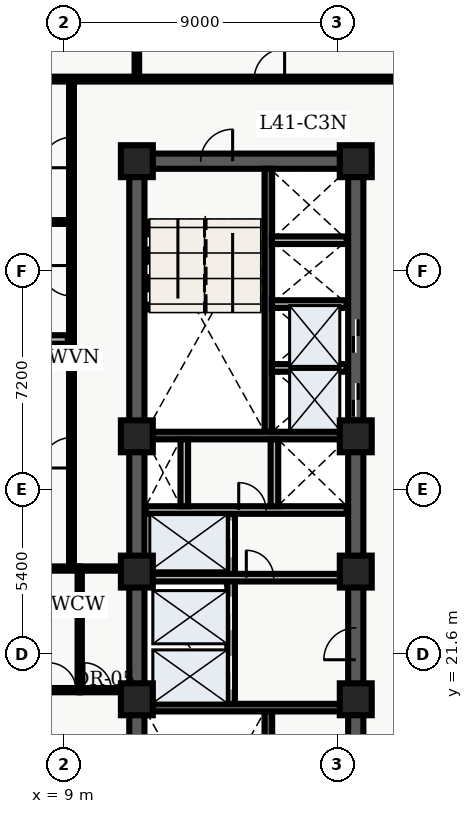
"""IFC4 building model, lengths in metres.
Left out: names, types, materials, properties, quantities, classifications, styles, units other than length and angle.
Written with IfcOpenShell. Run it as: python <this file> out.ifc"""

import sys

from ifc_helpers import new_model, entity, si_unit, converted_unit, direction, frame, origin_with_axes, origin_2d_with_axis, place, context, subcontext, project, spatial, polyline, rectangle, outline, extrude, element, fill, save


model = new_model("IFC4")
c1 = context("Model", 3, precision=1e-05, world=origin_with_axes(), true_north=direction((0.0, 1.0)))
c2 = subcontext(c1, "Body", "Model", "MODEL_VIEW")
j1 = project(units=[si_unit("LENGTHUNIT", "METRE"), converted_unit("PLANEANGLEUNIT", "DEGREE", entity("IfcPlaneAngleMeasure", 0.017), si_unit("PLANEANGLEUNIT", "RADIAN"), dimensions=[0, 0, 0, 0, 0, 0, 0])], contexts=[c1])
p1 = place(None, origin_with_axes())
s1 = spatial("IfcSite", under=j1, at=p1, CompositionType="ELEMENT")
p2 = place(p1, origin_with_axes())
s2 = spatial("IfcBuilding", under=s1, at=p2, CompositionType="ELEMENT")
p3 = place(p2, frame((0.0, 0.0, 168.0), z_axis=(0.0, 0.0, 1.0), x_axis=(1.0, 0.0, 0.0)))
s3 = spatial("IfcBuildingStorey", under=s2, at=p3, CompositionType="ELEMENT", Elevation=168.0)
p4 = place(p3, frame((11.4, 10.8, 0.0), z_axis=(0.0, 0.0, 1.0), x_axis=(0.0, 1.0, 0.0)))
e1 = element("IfcWall", 1, at=p4, inside=s3, PredefinedType="SHEAR", context=c2, shape_type="SweptSolid", body=[
    extrude(outline(polyline([(0.0, -0.25), (27.0, -0.25), (27.0, 0.25), (0.0, 0.25), (0.0, -0.25)])), origin_with_axes(), (0.0, 0.0, 1.0), 3.66),
])
p5 = place(p3, frame((11.4, 37.8, 0.0), z_axis=(0.0, 0.0, 1.0), x_axis=(1.0, 0.0, 0.0)))
e2 = element("IfcWall", 2, at=p5, inside=s3, PredefinedType="SHEAR", context=c2, shape_type="SweptSolid", body=[
    extrude(outline(polyline([(0.0, -0.25), (7.2, -0.25), (7.2, 0.25), (0.0, 0.25), (0.0, -0.25)])), origin_with_axes(), (0.0, 0.0, 1.0), 3.66),
])
p6 = place(p5, frame((2.625, 0.0, 0.0), z_axis=(0.0, 0.0, 1.0), x_axis=(1.0, 0.0, 0.0)))
e3 = element("IfcOpeningElement", 3, at=p6, cuts=e2, PredefinedType="OPENING", context=c2, shape_type="SweptSolid", body=[
    extrude(rectangle(XDim=1.05, YDim=0.52, at=origin_2d_with_axis()), origin_with_axes(), (0.0, 0.0, 1.0), 2.15),
])
p7 = place(p3, frame((18.6, 10.8, 0.0), z_axis=(0.0, 0.0, 1.0), x_axis=(0.0, 1.0, 0.0)))
e4 = element("IfcWall", 4, at=p7, inside=s3, PredefinedType="SHEAR", context=c2, shape_type="SweptSolid", body=[
    extrude(outline(polyline([(0.0, -0.25), (13.5, -0.25), (13.5, 0.25), (0.0, 0.25), (0.0, -0.25)])), origin_with_axes(), (0.0, 0.0, 1.0), 3.66),
])
p8 = place(p7, frame((11.125, 0.0, 0.0), z_axis=(0.0, 0.0, 1.0), x_axis=(1.0, 0.0, 0.0)))
e5 = element("IfcOpeningElement", 5, at=p8, cuts=e4, PredefinedType="OPENING", context=c2, shape_type="SweptSolid", body=[
    extrude(rectangle(XDim=1.05, YDim=0.52, at=origin_2d_with_axis()), origin_with_axes(), (0.0, 0.0, 1.0), 2.15),
])
p9 = place(p7, frame((4.325, 0.0, 0.0), z_axis=(0.0, 0.0, 1.0), x_axis=(1.0, 0.0, 0.0)))
e6 = element("IfcOpeningElement", 6, at=p9, cuts=e4, PredefinedType="OPENING", context=c2, shape_type="SweptSolid", body=[
    extrude(rectangle(XDim=1.05, YDim=0.52, at=origin_2d_with_axis()), origin_with_axes(), (0.0, 0.0, 1.0), 2.15),
])
p10 = place(p3, frame((18.6, 24.3, 0.0), z_axis=(0.0, 0.0, 1.0), x_axis=(0.0, 1.0, 0.0)))
e7 = element("IfcWall", 7, at=p10, inside=s3, PredefinedType="SHEAR", context=c2, shape_type="SweptSolid", body=[
    extrude(outline(polyline([(0.0, -0.25), (13.5, -0.25), (13.5, 0.25), (0.0, 0.25), (0.0, -0.25)])), origin_with_axes(), (0.0, 0.0, 1.0), 3.66),
])
p11 = place(p10, frame((5.65, 0.0, 0.0), z_axis=(0.0, 0.0, 1.0), x_axis=(1.0, 0.0, 0.0)))
e8 = element("IfcOpeningElement", 8, at=p11, cuts=e7, PredefinedType="OPENING", context=c2, shape_type="SweptSolid", body=[
    extrude(rectangle(XDim=1.1, YDim=0.52, at=origin_2d_with_axis()), origin_with_axes(), (0.0, 0.0, 1.0), 2.15),
])
p12 = place(p10, frame((7.75, 0.0, 0.0), z_axis=(0.0, 0.0, 1.0), x_axis=(1.0, 0.0, 0.0)))
e9 = element("IfcOpeningElement", 9, at=p12, cuts=e7, PredefinedType="OPENING", context=c2, shape_type="SweptSolid", body=[
    extrude(rectangle(XDim=1.1, YDim=0.52, at=origin_2d_with_axis()), origin_with_axes(), (0.0, 0.0, 1.0), 2.15),
])
p13 = place(p3, frame((15.725, 11.05, 0.0), z_axis=(0.0, 0.0, 1.0), x_axis=(0.0, 1.0, 0.0)))
e10 = element("IfcWall", 10, at=p13, inside=s3, PredefinedType="SHEAR", context=c2, shape_type="SweptSolid", body=[
    extrude(outline(polyline([(0.0, -0.125), (8.65, -0.125), (8.65, 0.125), (0.0, 0.125), (0.0, -0.125)])), origin_with_axes(), (0.0, 0.0, 1.0), 3.66),
])
p14 = place(p3, frame((11.65, 19.825, 0.0), z_axis=(0.0, 0.0, 1.0), x_axis=(1.0, 0.0, 0.0)))
e11 = element("IfcWall", 11, at=p14, inside=s3, PredefinedType="SHEAR", context=c2, shape_type="SweptSolid", body=[
    extrude(outline(polyline([(0.0, -0.125), (6.7, -0.125), (6.7, 0.125), (0.0, 0.125), (0.0, -0.125)])), origin_with_axes(), (0.0, 0.0, 1.0), 3.66),
])
p15 = place(p3, frame((15.725, 28.9, 0.0), z_axis=(0.0, 0.0, 1.0), x_axis=(0.0, 1.0, 0.0)))
e12 = element("IfcWall", 12, at=p15, inside=s3, PredefinedType="SHEAR", context=c2, shape_type="SweptSolid", body=[
    extrude(outline(polyline([(0.0, -0.125), (8.65, -0.125), (8.65, 0.125), (0.0, 0.125), (0.0, -0.125)])), origin_with_axes(), (0.0, 0.0, 1.0), 3.66),
])
p16 = place(p3, frame((11.65, 28.775, 0.0), z_axis=(0.0, 0.0, 1.0), x_axis=(1.0, 0.0, 0.0)))
e13 = element("IfcWall", 13, at=p16, inside=s3, PredefinedType="SHEAR", context=c2, shape_type="SweptSolid", body=[
    extrude(outline(polyline([(0.0, -0.125), (6.7, -0.125), (6.7, 0.125), (0.0, 0.125), (0.0, -0.125)])), origin_with_axes(), (0.0, 0.0, 1.0), 3.66),
])
p17 = place(p3, frame((14.5, 19.95, 0.0), z_axis=(0.0, 0.0, 1.0), x_axis=(0.0, 1.0, 0.0)))
e14 = element("IfcWall", 14, at=p17, inside=s3, PredefinedType="SOLIDWALL", context=c2, shape_type="SweptSolid", body=[
    extrude(outline(polyline([(0.0, -0.125), (6.25, -0.125), (6.25, 0.125), (0.0, 0.125), (0.0, -0.125)])), origin_with_axes(), (0.0, 0.0, 1.0), 2.7),
])
p18 = place(p17, frame((1.025, 0.0, 0.0), z_axis=(0.0, 0.0, 1.0), x_axis=(1.0, 0.0, 0.0)))
e15 = element("IfcOpeningElement", 15, at=p18, cuts=e14, PredefinedType="OPENING", context=c2, shape_type="SweptSolid", body=[
    extrude(rectangle(XDim=1.1, YDim=0.27, at=origin_2d_with_axis()), origin_with_axes(), (0.0, 0.0, 1.0), 2.15),
])
p19 = place(p17, frame((2.975, 0.0, 0.0), z_axis=(0.0, 0.0, 1.0), x_axis=(1.0, 0.0, 0.0)))
e16 = element("IfcOpeningElement", 16, at=p19, cuts=e14, PredefinedType="OPENING", context=c2, shape_type="SweptSolid", body=[
    extrude(rectangle(XDim=1.1, YDim=0.27, at=origin_2d_with_axis()), origin_with_axes(), (0.0, 0.0, 1.0), 2.15),
])
p20 = place(p17, frame((5.425, 0.0, 0.0), z_axis=(0.0, 0.0, 1.0), x_axis=(1.0, 0.0, 0.0)))
e17 = element("IfcOpeningElement", 17, at=p20, cuts=e14, PredefinedType="OPENING", context=c2, shape_type="SweptSolid", body=[
    extrude(rectangle(XDim=1.2, YDim=0.27, at=origin_2d_with_axis()), origin_with_axes(), (0.0, 0.0, 1.0), 2.15),
])
p21 = place(p3, frame((11.7, 24.1, 0.0), z_axis=(0.0, 0.0, 1.0), x_axis=(1.0, 0.0, 0.0)))
e18 = element("IfcWall", 18, at=p21, inside=s3, PredefinedType="SOLIDWALL", context=c2, shape_type="SweptSolid", body=[
    extrude(outline(polyline([(0.0, -0.125), (6.6, -0.125), (6.6, 0.125), (0.0, 0.125), (0.0, -0.125)])), origin_with_axes(), (0.0, 0.0, 1.0), 2.7),
])
p22 = place(p21, frame((3.75, 0.0, 0.0), z_axis=(0.0, 0.0, 1.0), x_axis=(1.0, 0.0, 0.0)))
e19 = element("IfcOpeningElement", 19, at=p22, cuts=e18, PredefinedType="OPENING", context=c2, shape_type="SweptSolid", body=[
    extrude(rectangle(XDim=0.9, YDim=0.27, at=origin_2d_with_axis()), origin_with_axes(), (0.0, 0.0, 1.0), 2.15),
])
p23 = place(p3, frame((11.7, 26.325, 0.0), z_axis=(0.0, 0.0, 1.0), x_axis=(1.0, 0.0, 0.0)))
e20 = element("IfcWall", 20, at=p23, inside=s3, PredefinedType="SOLIDWALL", context=c2, shape_type="SweptSolid", body=[
    extrude(outline(polyline([(0.0, -0.125), (6.6, -0.125), (6.6, 0.125), (0.0, 0.125), (0.0, -0.125)])), origin_with_axes(), (0.0, 0.0, 1.0), 2.7),
])
p24 = place(p23, frame((3.5, 0.0, 0.0), z_axis=(0.0, 0.0, 1.0), x_axis=(1.0, 0.0, 0.0)))
e21 = element("IfcOpeningElement", 21, at=p24, cuts=e20, PredefinedType="OPENING", context=c2, shape_type="SweptSolid", body=[
    extrude(rectangle(XDim=0.9, YDim=0.27, at=origin_2d_with_axis()), origin_with_axes(), (0.0, 0.0, 1.0), 2.15),
])
for number, where, z_axis, x_axis in (
    (22, (12.96, 26.45, 0.0), (0.0, 0.0, 1.0), (0.0, 1.0, 0.0)),
    (23, (15.925, 26.45, 0.0), (0.0, 0.0, 1.0), (0.0, 1.0, 0.0)),
):
    element("IfcWall", number, at=place(p3, frame(where, z_axis=z_axis, x_axis=x_axis)), inside=s3, PredefinedType="SOLIDWALL", context=c2, shape_type="SweptSolid", body=[
        extrude(outline(polyline([(0.0, -0.125), (2.2, -0.125), (2.2, 0.125), (0.0, 0.125), (0.0, -0.125)])), origin_with_axes(), (0.0, 0.0, 1.0), 2.7),
    ])
for number, where, z_axis, x_axis in (
    (24, (11.4, 20.1, 0.0), (0.0, 0.0, 1.0), (1.0, 0.0, 0.0)),
    (25, (11.4, 24.3, 0.0), (0.0, 0.0, 1.0), (1.0, 0.0, 0.0)),
    (26, (11.4, 28.75, 0.0), (0.0, 0.0, 1.0), (1.0, 0.0, 0.0)),
    (27, (11.4, 37.8, 0.0), (0.0, 0.0, 1.0), (1.0, 0.0, 0.0)),
    (28, (18.6, 20.1, 0.0), (0.0, 0.0, 1.0), (1.0, 0.0, 0.0)),
    (29, (18.6, 24.3, 0.0), (0.0, 0.0, 1.0), (1.0, 0.0, 0.0)),
    (30, (18.6, 28.75, 0.0), (0.0, 0.0, 1.0), (1.0, 0.0, 0.0)),
    (31, (18.6, 37.8, 0.0), (0.0, 0.0, 1.0), (1.0, 0.0, 0.0)),
):
    element("IfcColumn", number, at=place(p3, frame(where, z_axis=z_axis, x_axis=x_axis)), inside=s3, PredefinedType="COLUMN", context=c2, shape_type="SweptSolid", body=[
        extrude(rectangle(XDim=1.05, YDim=1.05, at=origin_2d_with_axis()), origin_with_axes(), (0.0, 0.0, 1.0), 3.9),
    ])
for number, where, z_axis, x_axis in (
    (32, (15.84, 31.0, 0.0), (0.0, 0.0, 1.0), (1.0, 0.0, 0.0)),
    (33, (15.84, 33.1, 0.0), (0.0, 0.0, 1.0), (1.0, 0.0, 0.0)),
    (34, (15.84, 35.2, 0.0), (0.0, 0.0, 1.0), (1.0, 0.0, 0.0)),
):
    element("IfcWall", number, at=place(p3, frame(where, z_axis=z_axis, x_axis=x_axis)), inside=s3, PredefinedType="SOLIDWALL", context=c2, shape_type="SweptSolid", body=[
        extrude(outline(polyline([(0.0, -0.125), (2.46, -0.125), (2.46, 0.125), (0.0, 0.125), (0.0, -0.125)])), origin_with_axes(), (0.0, 0.0, 1.0), 2.7),
    ])
p25 = place(p3, frame((9.52, 20.4, 0.0), z_axis=(0.0, 0.0, 1.0), x_axis=(0.0, 1.0, 0.0)))
e35 = element("IfcWall", 35, at=p25, inside=s3, PredefinedType="PARTITIONING", context=c2, shape_type="SweptSolid", body=[
    extrude(outline(polyline([(0.0, -0.07), (4.0, -0.07), (4.0, 0.07), (0.0, 0.07), (0.0, -0.07)])), origin_with_axes(), (0.0, 0.0, 1.0), 2.7),
])
p26 = place(p3, frame((9.52, 20.4, 0.0), z_axis=(0.0, 0.0, 1.0), x_axis=(1.0, 0.0, 0.0)))
e36 = element("IfcWall", 36, at=p26, inside=s3, PredefinedType="PARTITIONING", context=c2, shape_type="SweptSolid", body=[
    extrude(outline(polyline([(0.0, -0.07), (1.58, -0.07), (1.58, 0.07), (0.0, 0.07), (0.0, -0.07)])), origin_with_axes(), (0.0, 0.0, 1.0), 2.7),
])
p27 = place(p26, frame((0.59, 0.0, 0.0), z_axis=(0.0, 0.0, 1.0), x_axis=(1.0, 0.0, 0.0)))
e37 = element("IfcOpeningElement", 37, at=p27, cuts=e36, PredefinedType="OPENING", context=c2, shape_type="SweptSolid", body=[
    extrude(rectangle(XDim=0.9, YDim=0.16, at=origin_2d_with_axis()), origin_with_axes(), (0.0, 0.0, 1.0), 2.15),
])
p28 = place(p3, frame((9.52, 24.4, 0.0), z_axis=(0.0, 0.0, 1.0), x_axis=(1.0, 0.0, 0.0)))
e38 = element("IfcWall", 38, at=p28, inside=s3, PredefinedType="PARTITIONING", context=c2, shape_type="SweptSolid", body=[
    extrude(outline(polyline([(0.0, -0.07), (1.58, -0.07), (1.58, 0.07), (0.0, 0.07), (0.0, -0.07)])), origin_with_axes(), (0.0, 0.0, 1.0), 2.7),
])
p29 = place(p3, frame((2.6, 40.5, 0.0), z_axis=(0.0, 0.0, 1.0), x_axis=(1.0, 0.0, 0.0)))
e39 = element("IfcWall", 39, at=p29, inside=s3, PredefinedType="PARTITIONING", context=c2, shape_type="SweptSolid", body=[
    extrude(outline(polyline([(0.0, -0.08), (21.324, -0.08), (21.324, 0.08), (0.0, 0.08), (0.0, -0.08)])), origin_with_axes(), (0.0, 0.0, 1.0), 2.7),
])
p30 = place(p29, frame((4.395, 0.0, 0.0), z_axis=(0.0, 0.0, 1.0), x_axis=(1.0, 0.0, 0.0)))
e40 = element("IfcOpeningElement", 40, at=p30, cuts=e39, PredefinedType="OPENING", context=c2, shape_type="SweptSolid", body=[
    extrude(rectangle(XDim=1.2, YDim=0.18, at=origin_2d_with_axis()), origin_with_axes(), (0.0, 0.0, 1.0), 2.2),
])
p31 = place(p29, frame((13.16, 0.0, 0.0), z_axis=(0.0, 0.0, 1.0), x_axis=(1.0, 0.0, 0.0)))
e41 = element("IfcOpeningElement", 41, at=p31, cuts=e39, PredefinedType="OPENING", context=c2, shape_type="SweptSolid", body=[
    extrude(rectangle(XDim=1.0, YDim=0.18, at=origin_2d_with_axis()), origin_with_axes(), (0.0, 0.0, 1.0), 2.15),
])
p32 = place(p3, frame((9.25, 24.4, 0.0), z_axis=(0.0, 0.0, 1.0), x_axis=(0.0, 1.0, 0.0)))
e42 = element("IfcWall", 42, at=p32, inside=s3, PredefinedType="PARTITIONING", context=c2, shape_type="SweptSolid", body=[
    extrude(outline(polyline([(0.0, -0.08), (16.1, -0.08), (16.1, 0.08), (0.0, 0.08), (0.0, -0.08)])), origin_with_axes(), (0.0, 0.0, 1.0), 2.7),
])
p33 = place(p32, frame((3.808, 0.0, 0.0), z_axis=(0.0, 0.0, 1.0), x_axis=(1.0, 0.0, 0.0)))
e43 = element("IfcOpeningElement", 43, at=p33, cuts=e42, PredefinedType="OPENING", context=c2, shape_type="SweptSolid", body=[
    extrude(rectangle(XDim=1.0, YDim=0.18, at=origin_2d_with_axis()), origin_with_axes(), (0.0, 0.0, 1.0), 2.15),
])
p34 = place(p32, frame((9.467, 0.0, 0.0), z_axis=(0.0, 0.0, 1.0), x_axis=(1.0, 0.0, 0.0)))
e44 = element("IfcOpeningElement", 44, at=p34, cuts=e42, PredefinedType="OPENING", context=c2, shape_type="SweptSolid", body=[
    extrude(rectangle(XDim=1.0, YDim=0.18, at=origin_2d_with_axis()), origin_with_axes(), (0.0, 0.0, 1.0), 2.15),
])
p35 = place(p32, frame((13.684, 0.0, 0.0), z_axis=(0.0, 0.0, 1.0), x_axis=(1.0, 0.0, 0.0)))
e45 = element("IfcOpeningElement", 45, at=p35, cuts=e42, PredefinedType="OPENING", context=c2, shape_type="SweptSolid", body=[
    extrude(rectangle(XDim=1.0, YDim=0.18, at=origin_2d_with_axis()), origin_with_axes(), (0.0, 0.0, 1.0), 2.15),
])
p36 = place(p3, frame((0.335, 20.4, 0.0), z_axis=(0.0, 0.0, 1.0), x_axis=(1.0, 0.0, 0.0)))
e46 = element("IfcWall", 46, at=p36, inside=s3, PredefinedType="PARTITIONING", context=c2, shape_type="SweptSolid", body=[
    extrude(outline(polyline([(0.0, -0.07), (9.185, -0.07), (9.185, 0.07), (0.0, 0.07), (0.0, -0.07)])), origin_with_axes(), (0.0, 0.0, 1.0), 2.7),
])
p37 = place(p36, frame((8.615, 0.0, 0.0), z_axis=(0.0, 0.0, 1.0), x_axis=(1.0, 0.0, 0.0)))
e47 = element("IfcOpeningElement", 47, at=p37, cuts=e46, PredefinedType="OPENING", context=c2, shape_type="SweptSolid", body=[
    extrude(rectangle(XDim=0.9, YDim=0.16, at=origin_2d_with_axis()), origin_with_axes(), (0.0, 0.0, 1.0), 2.15),
])
p38 = place(p3, frame((0.335, 24.4, 0.0), z_axis=(0.0, 0.0, 1.0), x_axis=(1.0, 0.0, 0.0)))
e48 = element("IfcWall", 48, at=p38, inside=s3, PredefinedType="PARTITIONING", context=c2, shape_type="SweptSolid", body=[
    extrude(outline(polyline([(0.0, -0.07), (9.185, -0.07), (9.185, 0.07), (0.0, 0.07), (0.0, -0.07)])), origin_with_axes(), (0.0, 0.0, 1.0), 2.7),
])
p39 = place(p3, frame((0.335, 31.935, 0.0), z_axis=(0.0, 0.0, 1.0), x_axis=(1.0, 0.0, 0.0)))
e49 = element("IfcWall", 49, at=p39, inside=s3, PredefinedType="PARTITIONING", context=c2, shape_type="SweptSolid", body=[
    extrude(outline(polyline([(0.0, -0.14), (8.795, -0.14), (8.795, 0.14), (0.0, 0.14), (0.0, -0.14)])), origin_with_axes(), (0.0, 0.0, 1.0), 2.7),
])
p40 = place(p3, frame((0.335, 35.799, 0.0), z_axis=(0.0, 0.0, 1.0), x_axis=(1.0, 0.0, 0.0)))
e50 = element("IfcWall", 50, at=p40, inside=s3, PredefinedType="PARTITIONING", context=c2, shape_type="SweptSolid", body=[
    extrude(outline(polyline([(0.0, -0.062), (8.795, -0.062), (8.795, 0.062), (0.0, 0.062), (0.0, -0.062)])), origin_with_axes(), (0.0, 0.0, 1.0), 2.7),
])
p41 = place(p3, frame((11.4, 40.6, 0.0), z_axis=(0.0, 0.0, 1.0), x_axis=(0.0, 1.0, 0.0)))
e51 = element("IfcWall", 51, at=p41, inside=s3, PredefinedType="PARTITIONING", context=c2, shape_type="SweptSolid", body=[
    extrude(outline(polyline([(0.0, -0.075), (7.665, -0.075), (7.665, 0.075), (0.0, 0.075), (0.0, -0.075)])), origin_with_axes(), (0.0, 0.0, 1.0), 2.7),
])
p42 = place(p10, frame((5.65, 0.0, 0.0), z_axis=(0.0, 0.0, 1.0), x_axis=(1.0, 0.0, 0.0)))
e52 = element("IfcDoor", 52, at=p42, inside=s3, OperationType="SLIDING_TO_LEFT", PredefinedType="DOOR", context=c2, shape_type="SweptSolid", body=[
    extrude(rectangle(XDim=1.1, YDim=0.09, at=origin_2d_with_axis()), origin_with_axes(), (0.0, 0.0, 1.0), 2.15),
])
fill(e8, e52)
p43 = place(p10, frame((7.75, 0.0, 0.0), z_axis=(0.0, 0.0, 1.0), x_axis=(1.0, 0.0, 0.0)))
e53 = element("IfcDoor", 53, at=p43, inside=s3, OperationType="SLIDING_TO_RIGHT", PredefinedType="DOOR", context=c2, shape_type="SweptSolid", body=[
    extrude(rectangle(XDim=1.1, YDim=0.09, at=origin_2d_with_axis()), origin_with_axes(), (0.0, 0.0, 1.0), 2.15),
])
fill(e9, e53)
p44 = place(p17, frame((1.025, 0.0, 0.0), z_axis=(0.0, 0.0, 1.0), x_axis=(1.0, 0.0, 0.0)))
e54 = element("IfcDoor", 54, at=p44, inside=s3, OperationType="SLIDING_TO_LEFT", PredefinedType="DOOR", context=c2, shape_type="SweptSolid", body=[
    extrude(rectangle(XDim=1.1, YDim=0.09, at=origin_2d_with_axis()), origin_with_axes(), (0.0, 0.0, 1.0), 2.15),
])
fill(e15, e54)
p45 = place(p17, frame((2.975, 0.0, 0.0), z_axis=(0.0, 0.0, 1.0), x_axis=(1.0, 0.0, 0.0)))
e55 = element("IfcDoor", 55, at=p45, inside=s3, OperationType="SLIDING_TO_RIGHT", PredefinedType="DOOR", context=c2, shape_type="SweptSolid", body=[
    extrude(rectangle(XDim=1.1, YDim=0.09, at=origin_2d_with_axis()), origin_with_axes(), (0.0, 0.0, 1.0), 2.15),
])
fill(e16, e55)
p46 = place(p17, frame((5.425, 0.0, 0.0), z_axis=(0.0, 0.0, 1.0), x_axis=(1.0, 0.0, 0.0)))
e56 = element("IfcDoor", 56, at=p46, inside=s3, OperationType="DOUBLE_DOOR_SLIDING", PredefinedType="DOOR", context=c2, shape_type="SweptSolid", body=[
    extrude(rectangle(XDim=1.2, YDim=0.09, at=origin_2d_with_axis()), origin_with_axes(), (0.0, 0.0, 1.0), 2.15),
])
fill(e17, e56)
p47 = place(p5, frame((2.625, 0.0, 0.0), z_axis=(0.0, 0.0, 1.0), x_axis=(1.0, 0.0, 0.0)))
e57 = element("IfcDoor", 57, at=p47, inside=s3, OperationType="SINGLE_SWING_RIGHT", PredefinedType="DOOR", context=c2, shape_type="SweptSolid", body=[
    extrude(rectangle(XDim=1.05, YDim=0.09, at=origin_2d_with_axis()), origin_with_axes(), (0.0, 0.0, 1.0), 2.15),
])
fill(e3, e57)
p48 = place(p7, frame((11.125, 0.0, 0.0), z_axis=(0.0, 0.0, 1.0), x_axis=(1.0, 0.0, 0.0)))
e58 = element("IfcDoor", 58, at=p48, inside=s3, OperationType="SINGLE_SWING_LEFT", PredefinedType="DOOR", context=c2, shape_type="SweptSolid", body=[
    extrude(rectangle(XDim=1.05, YDim=0.09, at=origin_2d_with_axis()), origin_with_axes(), (0.0, 0.0, 1.0), 2.15),
])
fill(e5, e58)
p49 = place(p21, frame((3.75, 0.0, 0.0), z_axis=(0.0, 0.0, 1.0), x_axis=(1.0, 0.0, 0.0)))
e59 = element("IfcDoor", 59, at=p49, inside=s3, OperationType="SINGLE_SWING_LEFT", PredefinedType="DOOR", context=c2, shape_type="SweptSolid", body=[
    extrude(rectangle(XDim=0.9, YDim=0.09, at=origin_2d_with_axis()), origin_with_axes(), (0.0, 0.0, 1.0), 2.15),
])
fill(e19, e59)
p50 = place(p23, frame((3.5, 0.0, 0.0), z_axis=(0.0, 0.0, 1.0), x_axis=(1.0, 0.0, 0.0)))
e60 = element("IfcDoor", 60, at=p50, inside=s3, OperationType="SINGLE_SWING_LEFT", PredefinedType="DOOR", context=c2, shape_type="SweptSolid", body=[
    extrude(rectangle(XDim=0.9, YDim=0.09, at=origin_2d_with_axis()), origin_with_axes(), (0.0, 0.0, 1.0), 2.15),
])
fill(e21, e60)
p51 = place(p26, frame((0.59, 0.0, 0.0), z_axis=(0.0, 0.0, 1.0), x_axis=(1.0, 0.0, 0.0)))
e61 = element("IfcDoor", 61, at=p51, inside=s3, OperationType="SINGLE_SWING_LEFT", PredefinedType="DOOR", context=c2, shape_type="SweptSolid", body=[
    extrude(rectangle(XDim=0.9, YDim=0.084, at=origin_2d_with_axis()), origin_with_axes(), (0.0, 0.0, 1.0), 2.15),
])
fill(e37, e61)
p52 = place(p36, frame((8.615, 0.0, 0.0), z_axis=(0.0, 0.0, 1.0), x_axis=(1.0, 0.0, 0.0)))
e62 = element("IfcDoor", 62, at=p52, inside=s3, OperationType="SINGLE_SWING_LEFT", PredefinedType="DOOR", context=c2, shape_type="SweptSolid", body=[
    extrude(rectangle(XDim=0.9, YDim=0.084, at=origin_2d_with_axis()), origin_with_axes(), (0.0, 0.0, 1.0), 2.15),
])
fill(e47, e62)
p53 = place(p32, frame((3.808, 0.0, 0.0), z_axis=(0.0, 0.0, 1.0), x_axis=(1.0, 0.0, 0.0)))
e63 = element("IfcDoor", 63, at=p53, inside=s3, OperationType="SINGLE_SWING_LEFT", PredefinedType="DOOR", context=c2, shape_type="SweptSolid", body=[
    extrude(rectangle(XDim=1.0, YDim=0.09, at=origin_2d_with_axis()), origin_with_axes(), (0.0, 0.0, 1.0), 2.15),
])
fill(e43, e63)
p54 = place(p32, frame((9.467, 0.0, 0.0), z_axis=(0.0, 0.0, 1.0), x_axis=(1.0, 0.0, 0.0)))
e64 = element("IfcDoor", 64, at=p54, inside=s3, OperationType="SINGLE_SWING_RIGHT", PredefinedType="DOOR", context=c2, shape_type="SweptSolid", body=[
    extrude(rectangle(XDim=1.0, YDim=0.09, at=origin_2d_with_axis()), origin_with_axes(), (0.0, 0.0, 1.0), 2.15),
])
fill(e44, e64)
p55 = place(p32, frame((13.684, 0.0, 0.0), z_axis=(0.0, 0.0, 1.0), x_axis=(1.0, 0.0, 0.0)))
e65 = element("IfcDoor", 65, at=p55, inside=s3, OperationType="SINGLE_SWING_LEFT", PredefinedType="DOOR", context=c2, shape_type="SweptSolid", body=[
    extrude(rectangle(XDim=1.0, YDim=0.09, at=origin_2d_with_axis()), origin_with_axes(), (0.0, 0.0, 1.0), 2.15),
])
fill(e45, e65)
p56 = place(p29, frame((13.16, 0.0, 0.0), z_axis=(0.0, 0.0, 1.0), x_axis=(1.0, 0.0, 0.0)))
e66 = element("IfcDoor", 66, at=p56, inside=s3, OperationType="SINGLE_SWING_RIGHT", PredefinedType="DOOR", context=c2, shape_type="SweptSolid", body=[
    extrude(rectangle(XDim=1.0, YDim=0.09, at=origin_2d_with_axis()), origin_with_axes(), (0.0, 0.0, 1.0), 2.15),
])
fill(e41, e66)
save(model, sys.argv[1])
